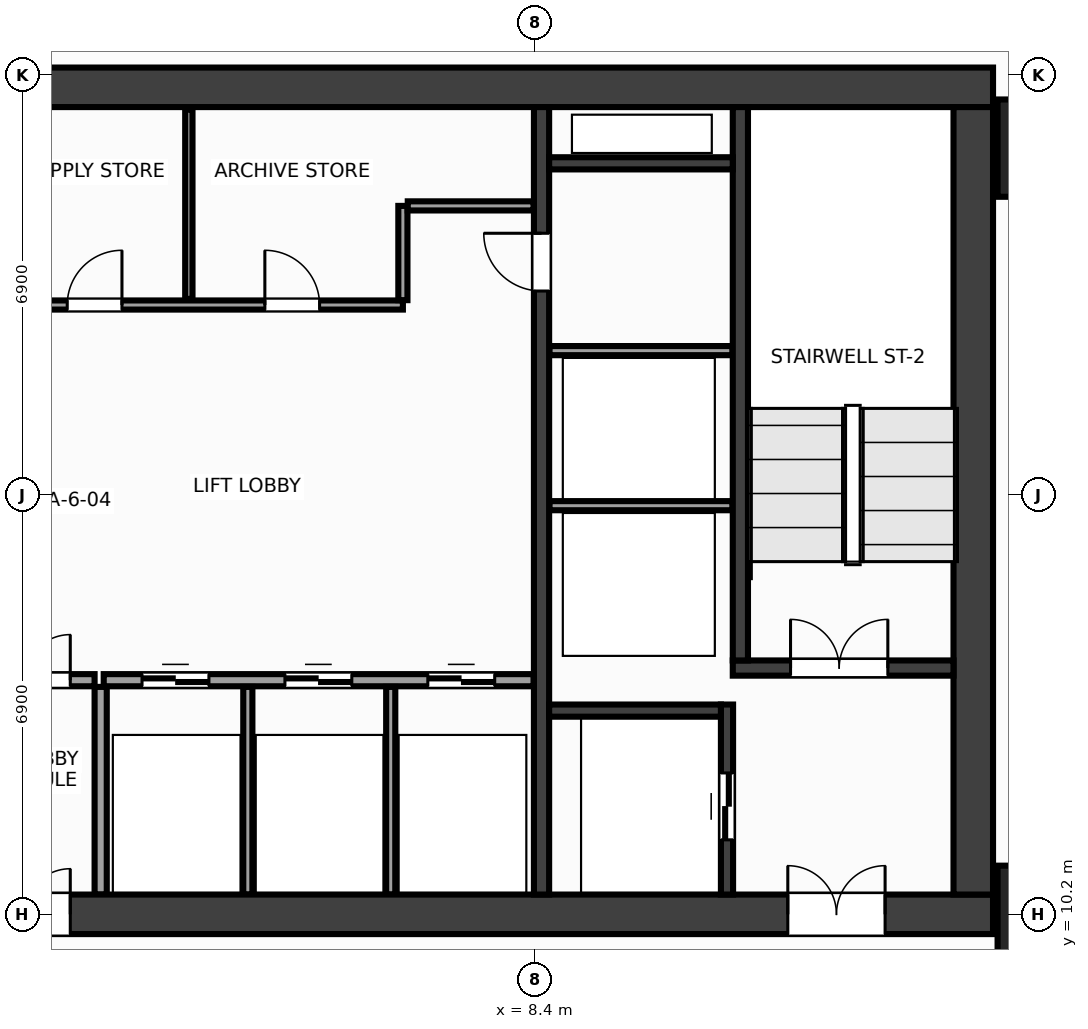
"""IFC4 building model, lengths in metres.
Left out: names, types, materials, properties, quantities, classifications, styles, units other than length and angle.
Written with IfcOpenShell. Run it as: python <this file> out.ifc"""

import sys

from ifc_helpers import new_model, si_unit, direction, frame, frame_2d, origin, origin_2d, place, context, subcontext, project, spatial, rectangle, extrude, source, transform, mapped, element, fill, save


model = new_model("IFC4")
c1 = context("Model", 3, precision=1e-05, world=origin(), true_north=direction((0.0, 1.0)))
c2 = subcontext(c1, "Body", "Model", "MODEL_VIEW")
j1 = project(units=[si_unit("LENGTHUNIT", "METRE"), si_unit("PLANEANGLEUNIT", "RADIAN")], contexts=[c1])
p1 = place(None, origin())
s1 = spatial("IfcSite", under=j1, at=p1, CompositionType="ELEMENT")
p2 = place(p1, origin())
s2 = spatial("IfcBuilding", under=s1, at=p2, CompositionType="ELEMENT")
p3 = place(p2, frame((0.0, 0.0, 99.2)))
s3 = spatial("IfcBuildingStorey", under=s2, at=p3, CompositionType="ELEMENT", Elevation=99.2)
m1 = source(origin(), c2, "Body", "SweptSolid", [
    extrude(rectangle(XDim=31.85, YDim=0.65, at=frame_2d((15.925, 0.0))), origin(), (0.0, 0.0, 1.0), 3.6),
])
p4 = place(p3, frame((-15.925, 23.8, 0.0), z_axis=(0.0, 0.0, 1.0), x_axis=(1.0, 0.0, 0.0)))
e1 = element("IfcWall", 1, at=p4, inside=s3, PredefinedType="SHEAR", context=c2, shape_type="MappedRepresentation", body=[
    mapped(m1, transform((0.0, 0.0, 0.0), x_axis=(1.0, 0.0, 0.0), y_axis=(0.0, 1.0, 0.0), z_axis=(0.0, 0.0, 1.0), scale=1.0)),
])
p5 = place(p3, frame((-15.925, 10.2, 0.0), z_axis=(0.0, 0.0, 1.0), x_axis=(1.0, 0.0, 0.0)))
e2 = element("IfcWall", 2, at=p5, inside=s3, PredefinedType="SHEAR", context=c2, shape_type="MappedRepresentation", body=[
    mapped(m1, transform((0.0, 0.0, 0.0), x_axis=(1.0, 0.0, 0.0), y_axis=(0.0, 1.0, 0.0), z_axis=(0.0, 0.0, 1.0), scale=1.0)),
])
p6 = place(p5, frame((1.775, 0.0, 0.0)))
e3 = element("IfcOpeningElement", 3, at=p6, cuts=e2, PredefinedType="OPENING", context=c2, shape_type="SweptSolid", body=[
    extrude(rectangle(XDim=1.6, YDim=2.15, at=frame_2d((0.8, 1.075))), frame((0.0, 0.337, 0.0), z_axis=(0.0, -1.0, 0.0), x_axis=(1.0, 0.0, 0.0)), (0.0, 0.0, 1.0), 0.674),
])
p7 = place(p5, frame((28.475, 0.0, 0.0)))
e4 = element("IfcOpeningElement", 4, at=p7, cuts=e2, PredefinedType="OPENING", context=c2, shape_type="SweptSolid", body=[
    extrude(rectangle(XDim=1.6, YDim=2.15, at=frame_2d((0.8, 1.075))), frame((0.0, 0.337, 0.0), z_axis=(0.0, -1.0, 0.0), x_axis=(1.0, 0.0, 0.0)), (0.0, 0.0, 1.0), 0.674),
])
p8 = place(p5, frame((15.175, 0.0, 0.0)))
e5 = element("IfcOpeningElement", 5, at=p8, cuts=e2, PredefinedType="OPENING", context=c2, shape_type="SweptSolid", body=[
    extrude(rectangle(XDim=1.5, YDim=2.2, at=frame_2d((0.75, 1.1))), frame((0.0, 0.337, 0.0), z_axis=(0.0, -1.0, 0.0), x_axis=(1.0, 0.0, 0.0)), (0.0, 0.0, 1.0), 0.674),
])
m2 = source(origin(), c2, "Body", "SweptSolid", [
    extrude(rectangle(XDim=12.95, YDim=0.65, at=frame_2d((6.475, 0.0))), origin(), (0.0, 0.0, 1.0), 3.6),
])
p9 = place(p3, frame((15.6, 10.525, 0.0), z_axis=(0.0, 0.0, 1.0), x_axis=(0.0, 1.0, 0.0)))
e6 = element("IfcWall", 6, at=p9, inside=s3, PredefinedType="SHEAR", context=c2, shape_type="MappedRepresentation", body=[
    mapped(m2, transform((0.0, 0.0, 0.0), x_axis=(1.0, 0.0, 0.0), y_axis=(0.0, 1.0, 0.0), z_axis=(0.0, 0.0, 1.0), scale=1.0)),
])
m3 = source(origin(), c2, "Body", "SweptSolid", [
    extrude(rectangle(XDim=12.95, YDim=0.25, at=frame_2d((6.475, 0.0))), origin(), (0.0, 0.0, 1.0), 3.6),
])
p10 = place(p3, frame((8.5, 10.525, 0.0), z_axis=(0.0, 0.0, 1.0), x_axis=(0.0, 1.0, 0.0)))
e7 = element("IfcWall", 7, at=p10, inside=s3, PredefinedType="SHEAR", context=c2, shape_type="MappedRepresentation", body=[
    mapped(m3, transform((0.0, 0.0, 0.0), x_axis=(1.0, 0.0, 0.0), y_axis=(0.0, 1.0, 0.0), z_axis=(0.0, 0.0, 1.0), scale=1.0)),
])
p11 = place(p10, frame((9.925, 0.0, 0.0)))
e8 = element("IfcOpeningElement", 8, at=p11, cuts=e7, PredefinedType="OPENING", context=c2, shape_type="SweptSolid", body=[
    extrude(rectangle(XDim=0.95, YDim=2.15, at=frame_2d((0.475, 1.075))), frame((0.0, 0.137, 0.0), z_axis=(0.0, -1.0, 0.0), x_axis=(1.0, 0.0, 0.0)), (0.0, 0.0, 1.0), 0.274),
])
m4 = source(origin(), c2, "Body", "SweptSolid", [
    extrude(rectangle(XDim=3.63, YDim=0.25, at=frame_2d((1.815, 0.0))), origin(), (0.0, 0.0, 1.0), 3.6),
])
p12 = place(p3, frame((11.645, 14.25, 0.0), z_axis=(0.0, 0.0, 1.0), x_axis=(1.0, 0.0, 0.0)))
e9 = element("IfcWall", 9, at=p12, inside=s3, PredefinedType="SHEAR", context=c2, shape_type="MappedRepresentation", body=[
    mapped(m4, transform((0.0, 0.0, 0.0), x_axis=(1.0, 0.0, 0.0), y_axis=(0.0, 1.0, 0.0), z_axis=(0.0, 0.0, 1.0), scale=1.0)),
])
p13 = place(p12, frame((0.95, 0.0, 0.0)))
e10 = element("IfcOpeningElement", 10, at=p13, cuts=e9, PredefinedType="OPENING", context=c2, shape_type="SweptSolid", body=[
    extrude(rectangle(XDim=1.6, YDim=2.15, at=frame_2d((0.8, 1.075))), frame((0.0, 0.137, 0.0), z_axis=(0.0, -1.0, 0.0), x_axis=(1.0, 0.0, 0.0)), (0.0, 0.0, 1.0), 0.274),
])
m5 = source(origin(), c2, "Body", "SweptSolid", [
    extrude(rectangle(XDim=9.1, YDim=0.25, at=frame_2d((4.55, 0.0))), origin(), (0.0, 0.0, 1.0), 3.6),
])
p14 = place(p3, frame((11.77, 14.375, 0.0), z_axis=(0.0, 0.0, 1.0), x_axis=(0.0, 1.0, 0.0)))
e11 = element("IfcWall", 11, at=p14, inside=s3, PredefinedType="SHEAR", context=c2, shape_type="MappedRepresentation", body=[
    mapped(m5, transform((0.0, 0.0, 0.0), x_axis=(1.0, 0.0, 0.0), y_axis=(0.0, 1.0, 0.0), z_axis=(0.0, 0.0, 1.0), scale=1.0)),
])
m6 = source(origin(), c2, "Body", "SweptSolid", [
    extrude(rectangle(XDim=3.125, YDim=0.2, at=frame_2d((1.562, 0.0))), origin(), (0.0, 0.0, 1.0), 3.6),
])
p15 = place(p3, frame((11.55, 10.525, 0.0), z_axis=(0.0, 0.0, 1.0), x_axis=(0.0, 1.0, 0.0)))
e12 = element("IfcWall", 12, at=p15, inside=s3, PredefinedType="SHEAR", context=c2, shape_type="MappedRepresentation", body=[
    mapped(m6, transform((0.0, 0.0, 0.0), x_axis=(1.0, 0.0, 0.0), y_axis=(0.0, 1.0, 0.0), z_axis=(0.0, 0.0, 1.0), scale=1.0)),
])
p16 = place(p15, frame((0.9, 0.0, 0.0)))
e13 = element("IfcOpeningElement", 13, at=p16, cuts=e12, PredefinedType="OPENING", context=c2, shape_type="SweptSolid", body=[
    extrude(rectangle(XDim=1.1, YDim=2.15, at=frame_2d((0.55, 1.075))), frame((0.0, 0.112, 0.0), z_axis=(0.0, -1.0, 0.0), x_axis=(1.0, 0.0, 0.0)), (0.0, 0.0, 1.0), 0.224),
])
m7 = source(origin(), c2, "Body", "SweptSolid", [
    extrude(rectangle(XDim=2.825, YDim=0.2, at=frame_2d((1.413, 0.0))), origin(), (0.0, 0.0, 1.0), 3.6),
])
p17 = place(p3, frame((8.625, 13.55, 0.0), z_axis=(0.0, 0.0, 1.0), x_axis=(1.0, 0.0, 0.0)))
e14 = element("IfcWall", 14, at=p17, inside=s3, PredefinedType="SHEAR", context=c2, shape_type="MappedRepresentation", body=[
    mapped(m7, transform((0.0, 0.0, 0.0), x_axis=(1.0, 0.0, 0.0), y_axis=(0.0, 1.0, 0.0), z_axis=(0.0, 0.0, 1.0), scale=1.0)),
])
m8 = source(origin(), c2, "Body", "SweptSolid", [
    extrude(rectangle(XDim=3.02, YDim=0.2, at=frame_2d((1.51, 0.0))), origin(), (0.0, 0.0, 1.0), 3.6),
])
p18 = place(p3, frame((8.625, 22.55, 0.0), z_axis=(0.0, 0.0, 1.0), x_axis=(1.0, 0.0, 0.0)))
e15 = element("IfcWall", 15, at=p18, inside=s3, PredefinedType="SHEAR", context=c2, shape_type="MappedRepresentation", body=[
    mapped(m8, transform((0.0, 0.0, 0.0), x_axis=(1.0, 0.0, 0.0), y_axis=(0.0, 1.0, 0.0), z_axis=(0.0, 0.0, 1.0), scale=1.0)),
])
m9 = source(origin(), c2, "Body", "SweptSolid", [
    extrude(rectangle(XDim=1.6, YDim=1.6, at=origin_2d()), origin(), (0.0, 0.0, 1.0), 3.6),
])
for number, where, z_axis, x_axis in (
    (16, (16.8, 10.2, 0.0), (0.0, 0.0, 1.0), (1.0, 0.0, 0.0)),
    (17, (16.8, 22.8, 0.0), (0.0, 0.0, 1.0), (1.0, 0.0, 0.0)),
):
    element("IfcColumn", number, at=place(p3, frame(where, z_axis=z_axis, x_axis=x_axis)), inside=s3, PredefinedType="COLUMN", context=c2, shape_type="MappedRepresentation", body=[
        mapped(m9, transform((0.0, 0.0, 0.0), x_axis=(1.0, 0.0, 0.0), y_axis=(0.0, 1.0, 0.0), z_axis=(0.0, 0.0, 1.0), scale=1.0)),
    ])
m10 = source(origin(), c2, "Body", "SweptSolid", [
    extrude(rectangle(XDim=3.01, YDim=0.15, at=frame_2d((1.505, 0.0))), origin(), (0.0, 0.0, 1.0), 3.36),
])
for number, where, z_axis, x_axis in (
    (18, (8.63, 16.92, 0.0), (0.0, 0.0, 1.0), (1.0, 0.0, 0.0)),
    (19, (8.63, 19.47, 0.0), (0.0, 0.0, 1.0), (1.0, 0.0, 0.0)),
):
    element("IfcWall", number, at=place(p3, frame(where, z_axis=z_axis, x_axis=x_axis)), inside=s3, PredefinedType="PARTITIONING", context=c2, shape_type="MappedRepresentation", body=[
        mapped(m10, transform((0.0, 0.0, 0.0), x_axis=(1.0, 0.0, 0.0), y_axis=(0.0, 1.0, 0.0), z_axis=(0.0, 0.0, 1.0), scale=1.0)),
    ])
m11 = source(origin(), c2, "Body", "SweptSolid", [
    extrude(rectangle(XDim=7.07, YDim=0.2, at=frame_2d((3.535, 0.0))), origin(), (0.0, 0.0, 1.0), 3.36),
])
p19 = place(p3, frame((1.3, 14.05, 0.0), z_axis=(0.0, 0.0, 1.0), x_axis=(1.0, 0.0, 0.0)))
e20 = element("IfcWall", 20, at=p19, inside=s3, PredefinedType="PARTITIONING", context=c2, shape_type="MappedRepresentation", body=[
    mapped(m11, transform((0.0, 0.0, 0.0), x_axis=(1.0, 0.0, 0.0), y_axis=(0.0, 1.0, 0.0), z_axis=(0.0, 0.0, 1.0), scale=1.0)),
])
p20 = place(p19, frame((0.63, 0.0, 0.0)))
e21 = element("IfcOpeningElement", 21, at=p20, cuts=e20, PredefinedType="OPENING", context=c2, shape_type="SweptSolid", body=[
    extrude(rectangle(XDim=1.1, YDim=2.15, at=frame_2d((0.55, 1.075))), frame((0.0, 0.112, 0.0), z_axis=(0.0, -1.0, 0.0), x_axis=(1.0, 0.0, 0.0)), (0.0, 0.0, 1.0), 0.224),
])
p21 = place(p19, frame((2.98, 0.0, 0.0)))
e22 = element("IfcOpeningElement", 22, at=p21, cuts=e20, PredefinedType="OPENING", context=c2, shape_type="SweptSolid", body=[
    extrude(rectangle(XDim=1.1, YDim=2.15, at=frame_2d((0.55, 1.075))), frame((0.0, 0.112, 0.0), z_axis=(0.0, -1.0, 0.0), x_axis=(1.0, 0.0, 0.0)), (0.0, 0.0, 1.0), 0.224),
])
p22 = place(p19, frame((5.33, 0.0, 0.0)))
e23 = element("IfcOpeningElement", 23, at=p22, cuts=e20, PredefinedType="OPENING", context=c2, shape_type="SweptSolid", body=[
    extrude(rectangle(XDim=1.1, YDim=2.15, at=frame_2d((0.55, 1.075))), frame((0.0, 0.112, 0.0), z_axis=(0.0, -1.0, 0.0), x_axis=(1.0, 0.0, 0.0)), (0.0, 0.0, 1.0), 0.224),
])
m12 = source(origin(), c2, "Body", "SweptSolid", [
    extrude(rectangle(XDim=3.415, YDim=0.2, at=frame_2d((1.708, 0.0))), origin(), (0.0, 0.0, 1.0), 3.36),
])
p23 = place(p3, frame((1.25, 10.525, 0.0), z_axis=(0.0, 0.0, 1.0), x_axis=(0.0, 1.0, 0.0)))
e24 = element("IfcWall", 24, at=p23, inside=s3, PredefinedType="PARTITIONING", context=c2, shape_type="MappedRepresentation", body=[
    mapped(m12, transform((0.0, 0.0, 0.0), x_axis=(1.0, 0.0, 0.0), y_axis=(0.0, 1.0, 0.0), z_axis=(0.0, 0.0, 1.0), scale=1.0)),
])
m13 = source(origin(), c2, "Body", "SweptSolid", [
    extrude(rectangle(XDim=2.3, YDim=0.2, at=frame_2d((1.15, 0.0))), origin(), (0.0, 0.0, 1.0), 3.36),
])
p24 = place(p3, frame((-1.15, 14.05, 0.0), z_axis=(0.0, 0.0, 1.0), x_axis=(1.0, 0.0, 0.0)))
e25 = element("IfcWall", 25, at=p24, inside=s3, PredefinedType="PARTITIONING", context=c2, shape_type="MappedRepresentation", body=[
    mapped(m13, transform((0.0, 0.0, 0.0), x_axis=(1.0, 0.0, 0.0), y_axis=(0.0, 1.0, 0.0), z_axis=(0.0, 0.0, 1.0), scale=1.0)),
])
p25 = place(p24, frame((0.4, 0.0, 0.0)))
e26 = element("IfcOpeningElement", 26, at=p25, cuts=e25, PredefinedType="OPENING", context=c2, shape_type="SweptSolid", body=[
    extrude(rectangle(XDim=1.5, YDim=2.2, at=frame_2d((0.75, 1.1))), frame((0.0, 0.112, 0.0), z_axis=(0.0, -1.0, 0.0), x_axis=(1.0, 0.0, 0.0)), (0.0, 0.0, 1.0), 0.224),
])
m14 = source(origin(), c2, "Body", "SweptSolid", [
    extrude(rectangle(XDim=14.59, YDim=0.15, at=frame_2d((7.295, 0.0))), origin(), (0.0, 0.0, 1.0), 3.36),
])
p26 = place(p3, frame((-8.37, 20.22, 0.0), z_axis=(0.0, 0.0, 1.0), x_axis=(1.0, 0.0, 0.0)))
e27 = element("IfcWall", 27, at=p26, inside=s3, PredefinedType="PARTITIONING", context=c2, shape_type="MappedRepresentation", body=[
    mapped(m14, transform((0.0, 0.0, 0.0), x_axis=(1.0, 0.0, 0.0), y_axis=(0.0, 1.0, 0.0), z_axis=(0.0, 0.0, 1.0), scale=1.0)),
])
p27 = place(p26, frame((0.86, 0.0, 0.0)))
e28 = element("IfcOpeningElement", 28, at=p27, cuts=e27, PredefinedType="OPENING", context=c2, shape_type="SweptSolid", body=[
    extrude(rectangle(XDim=0.9, YDim=2.15, at=frame_2d((0.45, 1.075))), frame((0.0, 0.087, 0.0), z_axis=(0.0, -1.0, 0.0), x_axis=(1.0, 0.0, 0.0)), (0.0, 0.0, 1.0), 0.174),
])
p28 = place(p26, frame((3.47, 0.0, 0.0)))
e29 = element("IfcOpeningElement", 29, at=p28, cuts=e27, PredefinedType="OPENING", context=c2, shape_type="SweptSolid", body=[
    extrude(rectangle(XDim=0.9, YDim=2.15, at=frame_2d((0.45, 1.075))), frame((0.0, 0.087, 0.0), z_axis=(0.0, -1.0, 0.0), x_axis=(1.0, 0.0, 0.0)), (0.0, 0.0, 1.0), 0.174),
])
p29 = place(p26, frame((6.17, 0.0, 0.0)))
e30 = element("IfcOpeningElement", 30, at=p29, cuts=e27, PredefinedType="OPENING", context=c2, shape_type="SweptSolid", body=[
    extrude(rectangle(XDim=0.9, YDim=2.15, at=frame_2d((0.45, 1.075))), frame((0.0, 0.087, 0.0), z_axis=(0.0, -1.0, 0.0), x_axis=(1.0, 0.0, 0.0)), (0.0, 0.0, 1.0), 0.174),
])
p30 = place(p26, frame((9.07, 0.0, 0.0)))
e31 = element("IfcOpeningElement", 31, at=p30, cuts=e27, PredefinedType="OPENING", context=c2, shape_type="SweptSolid", body=[
    extrude(rectangle(XDim=0.9, YDim=2.15, at=frame_2d((0.45, 1.075))), frame((0.0, 0.087, 0.0), z_axis=(0.0, -1.0, 0.0), x_axis=(1.0, 0.0, 0.0)), (0.0, 0.0, 1.0), 0.174),
])
p31 = place(p26, frame((12.32, 0.0, 0.0)))
e32 = element("IfcOpeningElement", 32, at=p31, cuts=e27, PredefinedType="OPENING", context=c2, shape_type="SweptSolid", body=[
    extrude(rectangle(XDim=0.9, YDim=2.15, at=frame_2d((0.45, 1.075))), frame((0.0, 0.087, 0.0), z_axis=(0.0, -1.0, 0.0), x_axis=(1.0, 0.0, 0.0)), (0.0, 0.0, 1.0), 0.174),
])
m15 = source(origin(), c2, "Body", "SweptSolid", [
    extrude(rectangle(XDim=1.55, YDim=0.15, at=frame_2d((0.775, 0.0))), origin(), (0.0, 0.0, 1.0), 3.36),
])
p32 = place(p3, frame((6.22, 20.3, 0.0), z_axis=(0.0, 0.0, 1.0), x_axis=(0.0, 1.0, 0.0)))
e33 = element("IfcWall", 33, at=p32, inside=s3, PredefinedType="PARTITIONING", context=c2, shape_type="MappedRepresentation", body=[
    mapped(m15, transform((0.0, 0.0, 0.0), x_axis=(1.0, 0.0, 0.0), y_axis=(0.0, 1.0, 0.0), z_axis=(0.0, 0.0, 1.0), scale=1.0)),
])
m16 = source(origin(), c2, "Body", "SweptSolid", [
    extrude(rectangle(XDim=2.07, YDim=0.15, at=frame_2d((1.035, 0.0))), origin(), (0.0, 0.0, 1.0), 3.36),
])
p33 = place(p3, frame((6.3, 21.85, 0.0), z_axis=(0.0, 0.0, 1.0), x_axis=(1.0, 0.0, 0.0)))
e34 = element("IfcWall", 34, at=p33, inside=s3, PredefinedType="PARTITIONING", context=c2, shape_type="MappedRepresentation", body=[
    mapped(m16, transform((0.0, 0.0, 0.0), x_axis=(1.0, 0.0, 0.0), y_axis=(0.0, 1.0, 0.0), z_axis=(0.0, 0.0, 1.0), scale=1.0)),
])
m17 = source(origin(), c2, "Body", "SweptSolid", [
    extrude(rectangle(XDim=3.415, YDim=0.15, at=frame_2d((1.708, 0.0))), origin(), (0.0, 0.0, 1.0), 3.36),
])
for number, where, z_axis, x_axis in (
    (35, (3.67, 10.525, 0.0), (0.0, 0.0, 1.0), (0.0, 1.0, 0.0)),
    (36, (6.02, 10.525, 0.0), (0.0, 0.0, 1.0), (0.0, 1.0, 0.0)),
):
    element("IfcWall", number, at=place(p3, frame(where, z_axis=z_axis, x_axis=x_axis)), inside=s3, PredefinedType="PARTITIONING", context=c2, shape_type="MappedRepresentation", body=[
        mapped(m17, transform((0.0, 0.0, 0.0), x_axis=(1.0, 0.0, 0.0), y_axis=(0.0, 1.0, 0.0), z_axis=(0.0, 0.0, 1.0), scale=1.0)),
    ])
m18 = source(origin(), c2, "Body", "SweptSolid", [
    extrude(rectangle(XDim=3.115, YDim=0.12, at=frame_2d((1.558, 0.0))), origin(), (0.0, 0.0, 1.0), 3.36),
])
p34 = place(p3, frame((2.7, 20.32, 0.0), z_axis=(0.0, 0.0, 1.0), x_axis=(0.0, 1.0, 0.0)))
e37 = element("IfcWall", 37, at=p34, inside=s3, PredefinedType="PARTITIONING", context=c2, shape_type="MappedRepresentation", body=[
    mapped(m18, transform((0.0, 0.0, 0.0), x_axis=(1.0, 0.0, 0.0), y_axis=(0.0, 1.0, 0.0), z_axis=(0.0, 0.0, 1.0), scale=1.0)),
])
m19 = source(origin(), c2, "Body", "SweptSolid", [
    extrude(rectangle(XDim=1.6, YDim=2.15, at=frame_2d((0.8, 1.075))), frame((0.0, 0.025, 0.0), z_axis=(0.0, -1.0, 0.0), x_axis=(1.0, 0.0, 0.0)), (0.0, 0.0, 1.0), 0.05),
])
p35 = place(p13, origin())
e38 = element("IfcDoor", 38, at=p35, inside=s3, OperationType="DOUBLE_DOOR_SINGLE_SWING", PredefinedType="DOOR", context=c2, shape_type="MappedRepresentation", body=[
    mapped(m19, transform((0.0, 0.0, 0.0), x_axis=(1.0, 0.0, 0.0), y_axis=(0.0, 1.0, 0.0), z_axis=(0.0, 0.0, 1.0), scale=1.0)),
])
fill(e10, e38)
p36 = place(p7, origin())
e39 = element("IfcDoor", 39, at=p36, inside=s3, OperationType="DOUBLE_DOOR_SINGLE_SWING", PredefinedType="DOOR", context=c2, shape_type="MappedRepresentation", body=[
    mapped(m19, transform((0.0, 0.0, 0.0), x_axis=(1.0, 0.0, 0.0), y_axis=(0.0, 1.0, 0.0), z_axis=(0.0, 0.0, 1.0), scale=1.0)),
])
fill(e4, e39)
m20 = source(origin(), c2, "Body", "SweptSolid", [
    extrude(rectangle(XDim=1.1, YDim=2.15, at=frame_2d((0.55, 1.075))), frame((0.0, 0.025, 0.0), z_axis=(0.0, -1.0, 0.0), x_axis=(1.0, 0.0, 0.0)), (0.0, 0.0, 1.0), 0.05),
])
p37 = place(p16, origin())
e40 = element("IfcDoor", 40, at=p37, inside=s3, OperationType="DOUBLE_DOOR_SLIDING", PredefinedType="DOOR", context=c2, shape_type="MappedRepresentation", body=[
    mapped(m20, transform((0.0, 0.0, 0.0), x_axis=(1.0, 0.0, 0.0), y_axis=(0.0, 1.0, 0.0), z_axis=(0.0, 0.0, 1.0), scale=1.0)),
])
fill(e13, e40)
m21 = source(origin(), c2, "Body", "SweptSolid", [
    extrude(rectangle(XDim=0.95, YDim=2.15, at=frame_2d((0.475, 1.075))), frame((0.0, 0.025, 0.0), z_axis=(0.0, -1.0, 0.0), x_axis=(1.0, 0.0, 0.0)), (0.0, 0.0, 1.0), 0.05),
])
p38 = place(p11, origin())
e41 = element("IfcDoor", 41, at=p38, inside=s3, OperationType="SINGLE_SWING_RIGHT", PredefinedType="DOOR", context=c2, shape_type="MappedRepresentation", body=[
    mapped(m21, transform((0.0, 0.0, 0.0), x_axis=(1.0, 0.0, 0.0), y_axis=(0.0, 1.0, 0.0), z_axis=(0.0, 0.0, 1.0), scale=1.0)),
])
fill(e8, e41)
p39 = place(p20, origin())
e42 = element("IfcDoor", 42, at=p39, inside=s3, OperationType="DOUBLE_DOOR_SLIDING", PredefinedType="DOOR", context=c2, shape_type="MappedRepresentation", body=[
    mapped(m20, transform((0.0, 0.0, 0.0), x_axis=(1.0, 0.0, 0.0), y_axis=(0.0, 1.0, 0.0), z_axis=(0.0, 0.0, 1.0), scale=1.0)),
])
fill(e21, e42)
p40 = place(p21, origin())
e43 = element("IfcDoor", 43, at=p40, inside=s3, OperationType="DOUBLE_DOOR_SLIDING", PredefinedType="DOOR", context=c2, shape_type="MappedRepresentation", body=[
    mapped(m20, transform((0.0, 0.0, 0.0), x_axis=(1.0, 0.0, 0.0), y_axis=(0.0, 1.0, 0.0), z_axis=(0.0, 0.0, 1.0), scale=1.0)),
])
fill(e22, e43)
p41 = place(p22, origin())
e44 = element("IfcDoor", 44, at=p41, inside=s3, OperationType="DOUBLE_DOOR_SLIDING", PredefinedType="DOOR", context=c2, shape_type="MappedRepresentation", body=[
    mapped(m20, transform((0.0, 0.0, 0.0), x_axis=(1.0, 0.0, 0.0), y_axis=(0.0, 1.0, 0.0), z_axis=(0.0, 0.0, 1.0), scale=1.0)),
])
fill(e23, e44)
m22 = source(origin(), c2, "Body", "SweptSolid", [
    extrude(rectangle(XDim=1.5, YDim=2.2, at=frame_2d((0.75, 1.1))), frame((0.0, 0.025, 0.0), z_axis=(0.0, -1.0, 0.0), x_axis=(1.0, 0.0, 0.0)), (0.0, 0.0, 1.0), 0.05),
])
p42 = place(p25, origin())
e45 = element("IfcDoor", 45, at=p42, inside=s3, OperationType="DOUBLE_DOOR_SINGLE_SWING", PredefinedType="DOOR", context=c2, shape_type="MappedRepresentation", body=[
    mapped(m22, transform((0.0, 0.0, 0.0), x_axis=(1.0, 0.0, 0.0), y_axis=(0.0, 1.0, 0.0), z_axis=(0.0, 0.0, 1.0), scale=1.0)),
])
fill(e26, e45)
p43 = place(p8, origin())
e46 = element("IfcDoor", 46, at=p43, inside=s3, OperationType="DOUBLE_DOOR_SINGLE_SWING", PredefinedType="DOOR", context=c2, shape_type="MappedRepresentation", body=[
    mapped(m22, transform((0.0, 0.0, 0.0), x_axis=(1.0, 0.0, 0.0), y_axis=(0.0, 1.0, 0.0), z_axis=(0.0, 0.0, 1.0), scale=1.0)),
])
fill(e5, e46)
m23 = source(origin(), c2, "Body", "SweptSolid", [
    extrude(rectangle(XDim=0.9, YDim=2.15, at=frame_2d((0.45, 1.075))), frame((0.0, 0.025, 0.0), z_axis=(0.0, -1.0, 0.0), x_axis=(1.0, 0.0, 0.0)), (0.0, 0.0, 1.0), 0.05),
])
p44 = place(p30, origin())
e47 = element("IfcDoor", 47, at=p44, inside=s3, OperationType="SINGLE_SWING_RIGHT", PredefinedType="DOOR", context=c2, shape_type="MappedRepresentation", body=[
    mapped(m23, transform((0.0, 0.0, 0.0), x_axis=(1.0, 0.0, 0.0), y_axis=(0.0, 1.0, 0.0), z_axis=(0.0, 0.0, 1.0), scale=1.0)),
])
fill(e31, e47)
p45 = place(p31, origin())
e48 = element("IfcDoor", 48, at=p45, inside=s3, OperationType="SINGLE_SWING_LEFT", PredefinedType="DOOR", context=c2, shape_type="MappedRepresentation", body=[
    mapped(m23, transform((0.0, 0.0, 0.0), x_axis=(1.0, 0.0, 0.0), y_axis=(0.0, 1.0, 0.0), z_axis=(0.0, 0.0, 1.0), scale=1.0)),
])
fill(e32, e48)
save(model, sys.argv[1])
